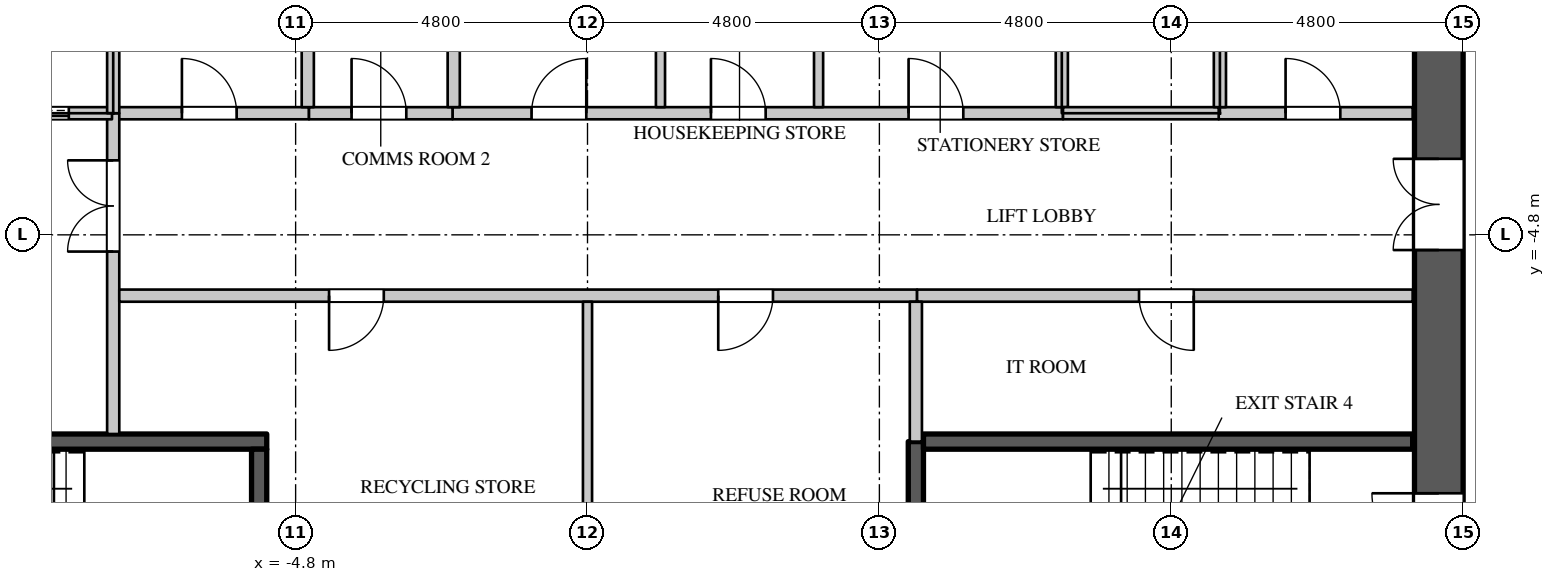
"""IFC4 building model, lengths in metres.
Left out: names, types, materials, properties, quantities, classifications, styles, units other than length and angle.
Written with IfcOpenShell. Run it as: python <this file> out.ifc"""

import sys

from ifc_helpers import new_model, si_unit, direction, frame, frame_2d, origin, place, context, subcontext, project, spatial, rectangle, extrude, element, fill, save


model = new_model("IFC4")
c1 = context("Model", 3, precision=1e-05, world=origin(), true_north=direction((0.0, 1.0)))
c2 = subcontext(c1, "Body", "Model", "MODEL_VIEW")
j1 = project(units=[si_unit("LENGTHUNIT", "METRE"), si_unit("PLANEANGLEUNIT", "RADIAN")], contexts=[c1])
p1 = place(None, origin())
s1 = spatial("IfcSite", under=j1, at=p1, CompositionType="ELEMENT")
p2 = place(p1, origin())
s2 = spatial("IfcBuilding", under=s1, at=p2, CompositionType="ELEMENT")
p3 = place(p2, frame((0.0, 0.0, 110.7)))
s3 = spatial("IfcBuildingStorey", under=s2, at=p3, CompositionType="ELEMENT", Elevation=110.7)
p4 = place(p3, frame((14.0, -11.2, 0.0), z_axis=(0.0, 0.0, 1.0), x_axis=(0.0, 1.0, 0.0)))
e1 = element("IfcWall", 1, at=p4, inside=s3, PredefinedType="SHEAR", context=c2, shape_type="SweptSolid", body=[
    extrude(rectangle(XDim=22.4, YDim=0.8, at=frame_2d((11.2, 0.0))), origin(), (0.0, 0.0, 1.0), 4.2),
])
p5 = place(p4, frame((20.25, 0.0, 0.0)))
e2 = element("IfcOpeningElement", 2, at=p5, cuts=e1, PredefinedType="OPENING", context=c2, shape_type="SweptSolid", body=[
    extrude(rectangle(XDim=1.1, YDim=2.2, at=frame_2d((0.55, 1.1))), frame((0.0, 0.41, 0.0), z_axis=(0.0, -1.0, 0.0), x_axis=(1.0, 0.0, 0.0)), (0.0, 0.0, 1.0), 0.82),
])
p6 = place(p4, frame((1.05, 0.0, 0.0)))
e3 = element("IfcOpeningElement", 3, at=p6, cuts=e1, PredefinedType="OPENING", context=c2, shape_type="SweptSolid", body=[
    extrude(rectangle(XDim=1.1, YDim=2.2, at=frame_2d((0.55, 1.1))), frame((0.0, 0.41, 0.0), z_axis=(0.0, -1.0, 0.0), x_axis=(1.0, 0.0, 0.0)), (0.0, 0.0, 1.0), 0.82),
])
p7 = place(p4, frame((14.75, 0.0, 0.0)))
e4 = element("IfcOpeningElement", 4, at=p7, cuts=e1, PredefinedType="OPENING", context=c2, shape_type="SweptSolid", body=[
    extrude(rectangle(XDim=1.5, YDim=2.4, at=frame_2d((0.75, 1.2))), frame((0.0, 0.41, 0.0), z_axis=(0.0, -1.0, 0.0), x_axis=(1.0, 0.0, 0.0)), (0.0, 0.0, 1.0), 0.82),
])
p8 = place(p4, frame((6.15, 0.0, 0.0)))
e5 = element("IfcOpeningElement", 5, at=p8, cuts=e1, PredefinedType="OPENING", context=c2, shape_type="SweptSolid", body=[
    extrude(rectangle(XDim=1.5, YDim=2.4, at=frame_2d((0.75, 1.2))), frame((0.0, 0.41, 0.0), z_axis=(0.0, -1.0, 0.0), x_axis=(1.0, 0.0, 0.0)), (0.0, 0.0, 1.0), 0.82),
])
p9 = place(p3, frame((-7.82, -2.8, 0.0), z_axis=(0.0, 0.0, 1.0), x_axis=(1.0, 0.0, 0.0)))
e6 = element("IfcWall", 6, at=p9, inside=s3, PredefinedType="PARTITIONING", context=c2, shape_type="SweptSolid", body=[
    extrude(rectangle(XDim=3.24, YDim=0.2, at=frame_2d((1.62, 0.0))), origin(), (0.0, 0.0, 1.0), 3.95),
])
p10 = place(p9, frame((1.15, 0.0, 0.0)))
e7 = element("IfcOpeningElement", 7, at=p10, cuts=e6, PredefinedType="OPENING", context=c2, shape_type="SweptSolid", body=[
    extrude(rectangle(XDim=0.9, YDim=2.2, at=frame_2d((0.45, 1.1))), frame((0.0, 0.11, 0.0), z_axis=(0.0, -1.0, 0.0), x_axis=(1.0, 0.0, 0.0)), (0.0, 0.0, 1.0), 0.22),
])
p11 = place(p3, frame((-7.8, -8.075, 0.0), z_axis=(0.0, 0.0, 1.0), x_axis=(0.0, 1.0, 0.0)))
e8 = element("IfcWall", 8, at=p11, inside=s3, PredefinedType="PARTITIONING", context=c2, shape_type="SweptSolid", body=[
    extrude(rectangle(XDim=5.275, YDim=0.2, at=frame_2d((2.637, 0.0))), origin(), (0.0, 0.0, 1.0), 3.95),
])
p12 = place(p11, frame((3.0, 0.0, 0.0)))
e9 = element("IfcOpeningElement", 9, at=p12, cuts=e8, PredefinedType="OPENING", context=c2, shape_type="SweptSolid", body=[
    extrude(rectangle(XDim=1.5, YDim=2.4, at=frame_2d((0.75, 1.2))), frame((0.0, 0.11, 0.0), z_axis=(0.0, -1.0, 0.0), x_axis=(1.0, 0.0, 0.0)), (0.0, 0.0, 1.0), 0.22),
])
p13 = place(p3, frame((-7.7, -5.8, 0.0), z_axis=(0.0, 0.0, 1.0), x_axis=(1.0, 0.0, 0.0)))
e10 = element("IfcWall", 10, at=p13, inside=s3, PredefinedType="PARTITIONING", context=c2, shape_type="SweptSolid", body=[
    extrude(rectangle(XDim=13.12, YDim=0.2, at=frame_2d((6.56, 0.0))), origin(), (0.0, 0.0, 1.0), 3.95),
])
p14 = place(p13, frame((3.45, 0.0, 0.0)))
e11 = element("IfcOpeningElement", 11, at=p14, cuts=e10, PredefinedType="OPENING", context=c2, shape_type="SweptSolid", body=[
    extrude(rectangle(XDim=0.9, YDim=2.2, at=frame_2d((0.45, 1.1))), frame((0.0, 0.11, 0.0), z_axis=(0.0, -1.0, 0.0), x_axis=(1.0, 0.0, 0.0)), (0.0, 0.0, 1.0), 0.22),
])
p15 = place(p13, frame((9.85, 0.0, 0.0)))
e12 = element("IfcOpeningElement", 12, at=p15, cuts=e10, PredefinedType="OPENING", context=c2, shape_type="SweptSolid", body=[
    extrude(rectangle(XDim=0.9, YDim=2.2, at=frame_2d((0.45, 1.1))), frame((0.0, 0.11, 0.0), z_axis=(0.0, -1.0, 0.0), x_axis=(1.0, 0.0, 0.0)), (0.0, 0.0, 1.0), 0.22),
])
p16 = place(p3, frame((-2.22, -2.8, 0.0), z_axis=(0.0, 0.0, 1.0), x_axis=(1.0, 0.0, 0.0)))
e13 = element("IfcWall", 13, at=p16, inside=s3, PredefinedType="PARTITIONING", context=c2, shape_type="SweptSolid", body=[
    extrude(rectangle(XDim=10.04, YDim=0.2, at=frame_2d((5.02, 0.0))), origin(), (0.0, 0.0, 1.0), 3.95),
])
p17 = place(p16, frame((1.3, 0.0, 0.0)))
e14 = element("IfcOpeningElement", 14, at=p17, cuts=e13, PredefinedType="OPENING", context=c2, shape_type="SweptSolid", body=[
    extrude(rectangle(XDim=0.9, YDim=2.2, at=frame_2d((0.45, 1.1))), frame((0.0, 0.11, 0.0), z_axis=(0.0, -1.0, 0.0), x_axis=(1.0, 0.0, 0.0)), (0.0, 0.0, 1.0), 0.22),
])
p18 = place(p16, frame((4.25, 0.0, 0.0)))
e15 = element("IfcOpeningElement", 15, at=p18, cuts=e13, PredefinedType="OPENING", context=c2, shape_type="SweptSolid", body=[
    extrude(rectangle(XDim=0.9, YDim=2.2, at=frame_2d((0.45, 1.1))), frame((0.0, 0.11, 0.0), z_axis=(0.0, -1.0, 0.0), x_axis=(1.0, 0.0, 0.0)), (0.0, 0.0, 1.0), 0.22),
])
p19 = place(p16, frame((7.5, 0.0, 0.0)))
e16 = element("IfcOpeningElement", 16, at=p19, cuts=e13, PredefinedType="OPENING", context=c2, shape_type="SweptSolid", body=[
    extrude(rectangle(XDim=0.9, YDim=2.2, at=frame_2d((0.45, 1.1))), frame((0.0, 0.11, 0.0), z_axis=(0.0, -1.0, 0.0), x_axis=(1.0, 0.0, 0.0)), (0.0, 0.0, 1.0), 0.22),
])
p20 = place(p3, frame((0.0, -11.17, 0.0), z_axis=(0.0, 0.0, 1.0), x_axis=(0.0, 1.0, 0.0)))
e17 = element("IfcWall", 17, at=p20, inside=s3, PredefinedType="PARTITIONING", context=c2, shape_type="SweptSolid", body=[
    extrude(rectangle(XDim=5.27, YDim=0.15, at=frame_2d((2.635, 0.0))), origin(), (0.0, 0.0, 1.0), 3.95),
])
for number, where, z_axis, x_axis in (
    (18, (1.2, -2.7, 0.0), (0.0, 0.0, 1.0), (0.0, 1.0, 0.0)),
    (19, (3.8, -2.7, 0.0), (0.0, 0.0, 1.0), (0.0, 1.0, 0.0)),
):
    element("IfcWall", number, at=place(p3, frame(where, z_axis=z_axis, x_axis=x_axis)), inside=s3, PredefinedType="PARTITIONING", context=c2, shape_type="SweptSolid", body=[
        extrude(rectangle(XDim=2.6, YDim=0.15, at=frame_2d((1.3, 0.0))), origin(), (0.0, 0.0, 1.0), 3.95),
    ])
p21 = place(p3, frame((-4.58, -2.8, 0.0), z_axis=(0.0, 0.0, 1.0), x_axis=(1.0, 0.0, 0.0)))
e20 = element("IfcWall", 20, at=p21, inside=s3, PredefinedType="PARTITIONING", context=c2, shape_type="SweptSolid", body=[
    extrude(rectangle(XDim=2.36, YDim=0.2, at=frame_2d((1.18, 0.0))), origin(), (0.0, 0.0, 1.0), 3.95),
])
p22 = place(p21, frame((0.7, 0.0, 0.0)))
e21 = element("IfcOpeningElement", 21, at=p22, cuts=e20, PredefinedType="OPENING", context=c2, shape_type="SweptSolid", body=[
    extrude(rectangle(XDim=0.9, YDim=2.2, at=frame_2d((0.45, 1.1))), frame((0.0, 0.11, 0.0), z_axis=(0.0, -1.0, 0.0), x_axis=(1.0, 0.0, 0.0)), (0.0, 0.0, 1.0), 0.22),
])
for number, where, z_axis, x_axis in (
    (22, (-4.6, -2.7, 0.0), (0.0, 0.0, 1.0), (0.0, 1.0, 0.0)),
    (23, (-2.2, -2.7, 0.0), (0.0, 0.0, 1.0), (0.0, 1.0, 0.0)),
):
    element("IfcWall", number, at=place(p3, frame(where, z_axis=z_axis, x_axis=x_axis)), inside=s3, PredefinedType="PARTITIONING", context=c2, shape_type="SweptSolid", body=[
        extrude(rectangle(XDim=2.6, YDim=0.2, at=frame_2d((1.3, 0.0))), origin(), (0.0, 0.0, 1.0), 3.95),
    ])
p23 = place(p3, frame((5.42, -5.8, 0.0), z_axis=(0.0, 0.0, 1.0), x_axis=(1.0, 0.0, 0.0)))
e24 = element("IfcWall", 24, at=p23, inside=s3, PredefinedType="PARTITIONING", context=c2, shape_type="SweptSolid", body=[
    extrude(rectangle(XDim=8.15, YDim=0.2, at=frame_2d((4.075, 0.0))), origin(), (0.0, 0.0, 1.0), 3.95),
])
p24 = place(p23, frame((3.65, 0.0, 0.0)))
e25 = element("IfcOpeningElement", 25, at=p24, cuts=e24, PredefinedType="OPENING", context=c2, shape_type="SweptSolid", body=[
    extrude(rectangle(XDim=0.9, YDim=2.2, at=frame_2d((0.45, 1.1))), frame((0.0, 0.11, 0.0), z_axis=(0.0, -1.0, 0.0), x_axis=(1.0, 0.0, 0.0)), (0.0, 0.0, 1.0), 0.22),
])
p25 = place(p3, frame((5.4, -8.2, 0.0), z_axis=(0.0, 0.0, 1.0), x_axis=(0.0, 1.0, 0.0)))
e26 = element("IfcWall", 26, at=p25, inside=s3, PredefinedType="PARTITIONING", context=c2, shape_type="SweptSolid", body=[
    extrude(rectangle(XDim=2.3, YDim=0.2, at=frame_2d((1.15, 0.0))), origin(), (0.0, 0.0, 1.0), 3.95),
])
p26 = place(p3, frame((10.38, -2.8, 0.0), z_axis=(0.0, 0.0, 1.0), x_axis=(1.0, 0.0, 0.0)))
e27 = element("IfcWall", 27, at=p26, inside=s3, PredefinedType="PARTITIONING", context=c2, shape_type="SweptSolid", body=[
    extrude(rectangle(XDim=3.19, YDim=0.2, at=frame_2d((1.595, 0.0))), origin(), (0.0, 0.0, 1.0), 3.95),
])
p27 = place(p26, frame((1.1, 0.0, 0.0)))
e28 = element("IfcOpeningElement", 28, at=p27, cuts=e27, PredefinedType="OPENING", context=c2, shape_type="SweptSolid", body=[
    extrude(rectangle(XDim=0.9, YDim=2.2, at=frame_2d((0.45, 1.1))), frame((0.0, 0.11, 0.0), z_axis=(0.0, -1.0, 0.0), x_axis=(1.0, 0.0, 0.0)), (0.0, 0.0, 1.0), 0.22),
])
p28 = place(p3, frame((-10.38, -2.8, 0.0), z_axis=(0.0, 0.0, 1.0), x_axis=(1.0, 0.0, 0.0)))
e29 = element("IfcWall", 29, at=p28, inside=s3, PredefinedType="PARTITIONING", context=c2, shape_type="SweptSolid", body=[
    extrude(rectangle(XDim=2.56, YDim=0.2, at=frame_2d((1.28, 0.0))), origin(), (0.0, 0.0, 1.0), 3.95),
])
p29 = place(p28, frame((0.75, 0.0, 0.0)))
e30 = element("IfcOpeningElement", 30, at=p29, cuts=e29, PredefinedType="OPENING", context=c2, shape_type="SweptSolid", body=[
    extrude(rectangle(XDim=1.1, YDim=2.2, at=frame_2d((0.55, 1.1))), frame((0.0, 0.11, 0.0), z_axis=(0.0, -1.0, 0.0), x_axis=(1.0, 0.0, 0.0)), (0.0, 0.0, 1.0), 0.22),
])
p30 = place(p3, frame((-7.8, -2.8, 0.0), z_axis=(0.0, 0.0, 1.0), x_axis=(0.0, 1.0, 0.0)))
e31 = element("IfcWall", 31, at=p30, inside=s3, PredefinedType="PARTITIONING", context=c2, shape_type="SweptSolid", body=[
    extrude(rectangle(XDim=2.8, YDim=0.2, at=frame_2d((1.4, 0.0))), origin(), (0.0, 0.0, 1.0), 3.95),
])
p31 = place(p3, frame((7.8, -2.7, 0.0), z_axis=(0.0, 0.0, 1.0), x_axis=(0.0, 1.0, 0.0)))
e32 = element("IfcWall", 32, at=p31, inside=s3, PredefinedType="PARTITIONING", context=c2, shape_type="SweptSolid", body=[
    extrude(rectangle(XDim=2.7, YDim=0.2, at=frame_2d((1.35, 0.0))), origin(), (0.0, 0.0, 1.0), 3.95),
])
p32 = place(p3, frame((7.82, -2.8, 0.0), z_axis=(0.0, 0.0, 1.0), x_axis=(1.0, 0.0, 0.0)))
e33 = element("IfcWall", 33, at=p32, inside=s3, PredefinedType="PARTITIONING", context=c2, shape_type="SweptSolid", body=[
    extrude(rectangle(XDim=2.56, YDim=0.2, at=frame_2d((1.28, 0.0))), origin(), (0.0, 0.0, 1.0), 3.95),
])
p33 = place(p3, frame((10.4, -2.7, 0.0), z_axis=(0.0, 0.0, 1.0), x_axis=(0.0, 1.0, 0.0)))
e34 = element("IfcWall", 34, at=p33, inside=s3, PredefinedType="PARTITIONING", context=c2, shape_type="SweptSolid", body=[
    extrude(rectangle(XDim=5.4, YDim=0.2, at=frame_2d((2.7, 0.0))), origin(), (0.0, 0.0, 1.0), 3.95),
])
p34 = place(p3, frame((-13.57, -8.2, 0.0), z_axis=(0.0, 0.0, 1.0), x_axis=(1.0, 0.0, 0.0)))
e35 = element("IfcWall", 35, at=p34, inside=s3, PredefinedType="SHEAR", context=c2, shape_type="SweptSolid", body=[
    extrude(rectangle(XDim=8.295, YDim=0.25, at=frame_2d((4.147, 0.0))), origin(), (0.0, 0.0, 1.0), 3.95),
])
p35 = place(p34, frame((0.15, 0.0, 0.0)))
e36 = element("IfcOpeningElement", 36, at=p35, cuts=e35, PredefinedType="OPENING", context=c2, shape_type="SweptSolid", body=[
    extrude(rectangle(XDim=1.1, YDim=2.2, at=frame_2d((0.55, 1.1))), frame((0.0, 0.135, 0.0), z_axis=(0.0, -1.0, 0.0), x_axis=(1.0, 0.0, 0.0)), (0.0, 0.0, 1.0), 0.27),
])
p36 = place(p3, frame((-5.4, -11.17, 0.0), z_axis=(0.0, 0.0, 1.0), x_axis=(0.0, 1.0, 0.0)))
e37 = element("IfcWall", 37, at=p36, inside=s3, PredefinedType="SHEAR", context=c2, shape_type="SweptSolid", body=[
    extrude(rectangle(XDim=2.845, YDim=0.25, at=frame_2d((1.422, 0.0))), origin(), (0.0, 0.0, 1.0), 3.95),
])
p37 = place(p3, frame((5.4, -11.17, 0.0), z_axis=(0.0, 0.0, 1.0), x_axis=(0.0, 1.0, 0.0)))
e38 = element("IfcWall", 38, at=p37, inside=s3, PredefinedType="SHEAR", context=c2, shape_type="SweptSolid", body=[
    extrude(rectangle(XDim=2.97, YDim=0.25, at=frame_2d((1.485, 0.0))), origin(), (0.0, 0.0, 1.0), 3.95),
])
p38 = place(p3, frame((5.525, -8.2, 0.0), z_axis=(0.0, 0.0, 1.0), x_axis=(1.0, 0.0, 0.0)))
e39 = element("IfcWall", 39, at=p38, inside=s3, PredefinedType="SHEAR", context=c2, shape_type="SweptSolid", body=[
    extrude(rectangle(XDim=8.045, YDim=0.25, at=frame_2d((4.022, 0.0))), origin(), (0.0, 0.0, 1.0), 3.95),
])
p39 = place(p27, origin())
e40 = element("IfcDoor", 40, at=p39, inside=s3, OperationType="SINGLE_SWING_LEFT", PredefinedType="DOOR", context=c2, shape_type="SweptSolid", body=[
    extrude(rectangle(XDim=0.9, YDim=2.2, at=frame_2d((0.45, 1.1))), frame((0.0, 0.025, 0.0), z_axis=(0.0, -1.0, 0.0), x_axis=(1.0, 0.0, 0.0)), (0.0, 0.0, 1.0), 0.05),
])
fill(e28, e40)
p40 = place(p14, origin())
e41 = element("IfcDoor", 41, at=p40, inside=s3, OperationType="SINGLE_SWING_RIGHT", PredefinedType="DOOR", context=c2, shape_type="SweptSolid", body=[
    extrude(rectangle(XDim=0.9, YDim=2.2, at=frame_2d((0.45, 1.1))), frame((0.0, 0.025, 0.0), z_axis=(0.0, -1.0, 0.0), x_axis=(1.0, 0.0, 0.0)), (0.0, 0.0, 1.0), 0.05),
])
fill(e11, e41)
p41 = place(p15, origin())
e42 = element("IfcDoor", 42, at=p41, inside=s3, OperationType="SINGLE_SWING_RIGHT", PredefinedType="DOOR", context=c2, shape_type="SweptSolid", body=[
    extrude(rectangle(XDim=0.9, YDim=2.2, at=frame_2d((0.45, 1.1))), frame((0.0, 0.025, 0.0), z_axis=(0.0, -1.0, 0.0), x_axis=(1.0, 0.0, 0.0)), (0.0, 0.0, 1.0), 0.05),
])
fill(e12, e42)
p42 = place(p24, origin())
e43 = element("IfcDoor", 43, at=p42, inside=s3, OperationType="SINGLE_SWING_LEFT", PredefinedType="DOOR", context=c2, shape_type="SweptSolid", body=[
    extrude(rectangle(XDim=0.9, YDim=2.2, at=frame_2d((0.45, 1.1))), frame((0.0, 0.025, 0.0), z_axis=(0.0, -1.0, 0.0), x_axis=(1.0, 0.0, 0.0)), (0.0, 0.0, 1.0), 0.05),
])
fill(e25, e43)
p43 = place(p10, origin())
e44 = element("IfcDoor", 44, at=p43, inside=s3, OperationType="SINGLE_SWING_LEFT", PredefinedType="DOOR", context=c2, shape_type="SweptSolid", body=[
    extrude(rectangle(XDim=0.9, YDim=2.2, at=frame_2d((0.45, 1.1))), frame((0.0, 0.025, 0.0), z_axis=(0.0, -1.0, 0.0), x_axis=(1.0, 0.0, 0.0)), (0.0, 0.0, 1.0), 0.05),
])
fill(e7, e44)
p44 = place(p22, origin())
e45 = element("IfcDoor", 45, at=p44, inside=s3, OperationType="SINGLE_SWING_LEFT", PredefinedType="DOOR", context=c2, shape_type="SweptSolid", body=[
    extrude(rectangle(XDim=0.9, YDim=2.2, at=frame_2d((0.45, 1.1))), frame((0.0, 0.025, 0.0), z_axis=(0.0, -1.0, 0.0), x_axis=(1.0, 0.0, 0.0)), (0.0, 0.0, 1.0), 0.05),
])
fill(e21, e45)
p45 = place(p17, origin())
e46 = element("IfcDoor", 46, at=p45, inside=s3, OperationType="SINGLE_SWING_RIGHT", PredefinedType="DOOR", context=c2, shape_type="SweptSolid", body=[
    extrude(rectangle(XDim=0.9, YDim=2.2, at=frame_2d((0.45, 1.1))), frame((0.0, 0.025, 0.0), z_axis=(0.0, -1.0, 0.0), x_axis=(1.0, 0.0, 0.0)), (0.0, 0.0, 1.0), 0.05),
])
fill(e14, e46)
p46 = place(p18, origin())
e47 = element("IfcDoor", 47, at=p46, inside=s3, OperationType="SINGLE_SWING_LEFT", PredefinedType="DOOR", context=c2, shape_type="SweptSolid", body=[
    extrude(rectangle(XDim=0.9, YDim=2.2, at=frame_2d((0.45, 1.1))), frame((0.0, 0.025, 0.0), z_axis=(0.0, -1.0, 0.0), x_axis=(1.0, 0.0, 0.0)), (0.0, 0.0, 1.0), 0.05),
])
fill(e15, e47)
p47 = place(p19, origin())
e48 = element("IfcDoor", 48, at=p47, inside=s3, OperationType="SINGLE_SWING_LEFT", PredefinedType="DOOR", context=c2, shape_type="SweptSolid", body=[
    extrude(rectangle(XDim=0.9, YDim=2.2, at=frame_2d((0.45, 1.1))), frame((0.0, 0.025, 0.0), z_axis=(0.0, -1.0, 0.0), x_axis=(1.0, 0.0, 0.0)), (0.0, 0.0, 1.0), 0.05),
])
fill(e16, e48)
p48 = place(p29, origin())
e49 = element("IfcDoor", 49, at=p48, inside=s3, OperationType="DOUBLE_DOOR_SLIDING", PredefinedType="DOOR", context=c2, shape_type="SweptSolid", body=[
    extrude(rectangle(XDim=1.1, YDim=2.2, at=frame_2d((0.55, 1.1))), frame((0.0, 0.025, 0.0), z_axis=(0.0, -1.0, 0.0), x_axis=(1.0, 0.0, 0.0)), (0.0, 0.0, 1.0), 0.05),
])
fill(e30, e49)
p49 = place(p12, origin())
e50 = element("IfcDoor", 50, at=p49, inside=s3, OperationType="DOUBLE_DOOR_SINGLE_SWING", PredefinedType="DOOR", context=c2, shape_type="SweptSolid", body=[
    extrude(rectangle(XDim=1.5, YDim=2.4, at=frame_2d((0.75, 1.2))), frame((0.0, 0.025, 0.0), z_axis=(0.0, -1.0, 0.0), x_axis=(1.0, 0.0, 0.0)), (0.0, 0.0, 1.0), 0.05),
])
fill(e9, e50)
p50 = place(p6, origin())
e51 = element("IfcDoor", 51, at=p50, inside=s3, OperationType="SINGLE_SWING_RIGHT", PredefinedType="DOOR", context=c2, shape_type="SweptSolid", body=[
    extrude(rectangle(XDim=1.1, YDim=2.2, at=frame_2d((0.55, 1.1))), frame((0.0, 0.395, 0.0), z_axis=(0.0, -1.0, 0.0), x_axis=(1.0, 0.0, 0.0)), (0.0, 0.0, 1.0), 0.05),
])
fill(e3, e51)
p51 = place(p8, origin())
e52 = element("IfcDoor", 52, at=p51, inside=s3, OperationType="DOUBLE_DOOR_SINGLE_SWING", PredefinedType="DOOR", context=c2, shape_type="SweptSolid", body=[
    extrude(rectangle(XDim=1.5, YDim=2.4, at=frame_2d((0.75, 1.2))), frame((0.0, 0.395, 0.0), z_axis=(0.0, -1.0, 0.0), x_axis=(1.0, 0.0, 0.0)), (0.0, 0.0, 1.0), 0.05),
])
fill(e5, e52)
save(model, sys.argv[1])
